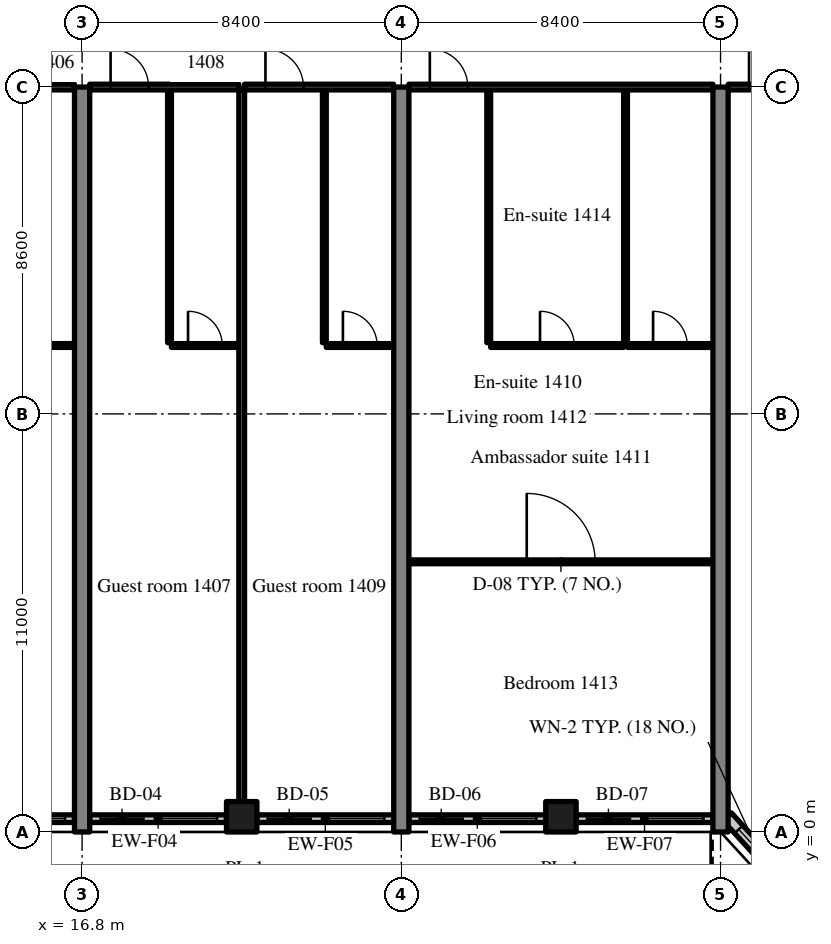
"""IFC4 building model, lengths in metres.
Left out: names, types, materials, properties, quantities, classifications, styles, units other than length and angle.
Written with IfcOpenShell. Run it as: python <this file> out.ifc"""

import sys

from ifc_helpers import new_model, si_unit, direction, frame, frame_2d, origin, origin_2d, place, context, subcontext, project, spatial, rectangle, extrude, source, transform, mapped, element, fill, save


model = new_model("IFC4")
c1 = context("Model", 3, precision=1e-05, world=origin(), true_north=direction((0.0, 1.0)))
c2 = subcontext(c1, "Body", "Model", "MODEL_VIEW")
j1 = project(units=[si_unit("LENGTHUNIT", "METRE"), si_unit("PLANEANGLEUNIT", "RADIAN")], contexts=[c1])
p1 = place(None, origin())
s1 = spatial("IfcSite", under=j1, at=p1, CompositionType="ELEMENT")
p2 = place(p1, origin())
s2 = spatial("IfcBuilding", under=s1, at=p2, CompositionType="ELEMENT")
p3 = place(p2, frame((0.0, 0.0, 62.0)))
s3 = spatial("IfcBuildingStorey", under=s2, at=p3, CompositionType="ELEMENT", Elevation=62.0)
m1 = source(origin(), c2, "Body", "SweptSolid", [
    extrude(rectangle(XDim=19.6, YDim=0.4, at=frame_2d((9.8, 0.0))), origin(), (0.0, 0.0, 1.0), 3.52),
])
for number, where, z_axis, x_axis in (
    (1, (16.8, 0.0, 0.0), (0.0, 0.0, 1.0), (0.0, 1.0, 0.0)),
    (2, (25.2, 0.0, 0.0), (0.0, 0.0, 1.0), (0.0, 1.0, 0.0)),
    (3, (33.6, 0.0, 0.0), (0.0, 0.0, 1.0), (0.0, 1.0, 0.0)),
):
    element("IfcWall", number, at=place(p3, frame(where, z_axis=z_axis, x_axis=x_axis)), inside=s3, PredefinedType="SHEAR", context=c2, shape_type="MappedRepresentation", body=[
        mapped(m1, transform((0.0, 0.0, 0.0), scale=1.0)),
    ])
m2 = source(origin(), c2, "Body", "SweptSolid", [
    extrude(rectangle(XDim=0.8, YDim=0.8, at=origin_2d()), origin(), (0.0, 0.0, 1.0), 3.52),
])
for number, where, z_axis, x_axis in (
    (4, (21.0, 0.4, 0.0), (0.0, 0.0, 1.0), (1.0, 0.0, 0.0)),
    (5, (29.4, 0.4, 0.0), (0.0, 0.0, 1.0), (1.0, 0.0, 0.0)),
):
    element("IfcColumn", number, at=place(p3, frame(where, z_axis=z_axis, x_axis=x_axis)), inside=s3, PredefinedType="COLUMN", context=c2, shape_type="MappedRepresentation", body=[
        mapped(m2, transform((0.0, 0.0, 0.0), scale=1.0)),
    ])
m3 = source(origin(), c2, "Body", "SweptSolid", [
    extrude(rectangle(XDim=3.6, YDim=0.2, at=frame_2d((1.8, 0.0))), origin(), (0.0, 0.0, 1.0), 2.82),
])
p4 = place(p3, frame((13.0, 0.35, 0.0), z_axis=(0.0, 0.0, 1.0), x_axis=(1.0, 0.0, 0.0)))
e6 = element("IfcWall", 6, at=p4, inside=s3, PredefinedType="SOLIDWALL", context=c2, shape_type="MappedRepresentation", body=[
    mapped(m3, transform((0.0, 0.0, 0.0), scale=1.0)),
])
m4 = source(origin(), c2, "Body", "SweptSolid", [
    extrude(rectangle(XDim=1.2, YDim=2.4, at=frame_2d((0.6, 1.2))), frame((0.0, 0.11, 0.0), z_axis=(0.0, -1.0, 0.0), x_axis=(1.0, 0.0, 0.0)), (0.0, 0.0, 1.0), 0.22),
])
p5 = place(p4, frame((0.25, 0.0, 0.0)))
e7 = element("IfcOpeningElement", 7, at=p5, cuts=e6, PredefinedType="OPENING", context=c2, shape_type="MappedRepresentation", body=[
    mapped(m4, transform((0.0, 0.0, 0.0), scale=1.0)),
])
m5 = source(origin(), c2, "Body", "SweptSolid", [
    extrude(rectangle(XDim=1.5, YDim=1.5, at=frame_2d((0.75, 0.75))), frame((0.0, 0.11, 0.0), z_axis=(0.0, -1.0, 0.0), x_axis=(1.0, 0.0, 0.0)), (0.0, 0.0, 1.0), 0.22),
])
p6 = place(p4, frame((1.85, 0.0, 0.9)))
e8 = element("IfcOpeningElement", 8, at=p6, cuts=e6, PredefinedType="OPENING", context=c2, shape_type="MappedRepresentation", body=[
    mapped(m5, transform((0.0, 0.0, 0.0), scale=1.0)),
])
p7 = place(p3, frame((17.0, 0.35, 0.0), z_axis=(0.0, 0.0, 1.0), x_axis=(1.0, 0.0, 0.0)))
e9 = element("IfcWall", 9, at=p7, inside=s3, PredefinedType="SOLIDWALL", context=c2, shape_type="MappedRepresentation", body=[
    mapped(m3, transform((0.0, 0.0, 0.0), scale=1.0)),
])
p8 = place(p7, frame((0.25, 0.0, 0.0)))
e10 = element("IfcOpeningElement", 10, at=p8, cuts=e9, PredefinedType="OPENING", context=c2, shape_type="MappedRepresentation", body=[
    mapped(m4, transform((0.0, 0.0, 0.0), scale=1.0)),
])
p9 = place(p7, frame((1.85, 0.0, 0.9)))
e11 = element("IfcOpeningElement", 11, at=p9, cuts=e9, PredefinedType="OPENING", context=c2, shape_type="MappedRepresentation", body=[
    mapped(m5, transform((0.0, 0.0, 0.0), scale=1.0)),
])
p10 = place(p3, frame((21.4, 0.35, 0.0), z_axis=(0.0, 0.0, 1.0), x_axis=(1.0, 0.0, 0.0)))
e12 = element("IfcWall", 12, at=p10, inside=s3, PredefinedType="SOLIDWALL", context=c2, shape_type="MappedRepresentation", body=[
    mapped(m3, transform((0.0, 0.0, 0.0), scale=1.0)),
])
p11 = place(p10, frame((0.25, 0.0, 0.0)))
e13 = element("IfcOpeningElement", 13, at=p11, cuts=e12, PredefinedType="OPENING", context=c2, shape_type="MappedRepresentation", body=[
    mapped(m4, transform((0.0, 0.0, 0.0), scale=1.0)),
])
p12 = place(p10, frame((1.85, 0.0, 0.9)))
e14 = element("IfcOpeningElement", 14, at=p12, cuts=e12, PredefinedType="OPENING", context=c2, shape_type="MappedRepresentation", body=[
    mapped(m5, transform((0.0, 0.0, 0.0), scale=1.0)),
])
p13 = place(p3, frame((25.4, 0.35, 0.0), z_axis=(0.0, 0.0, 1.0), x_axis=(1.0, 0.0, 0.0)))
e15 = element("IfcWall", 15, at=p13, inside=s3, PredefinedType="SOLIDWALL", context=c2, shape_type="MappedRepresentation", body=[
    mapped(m3, transform((0.0, 0.0, 0.0), scale=1.0)),
])
p14 = place(p13, frame((0.25, 0.0, 0.0)))
e16 = element("IfcOpeningElement", 16, at=p14, cuts=e15, PredefinedType="OPENING", context=c2, shape_type="MappedRepresentation", body=[
    mapped(m4, transform((0.0, 0.0, 0.0), scale=1.0)),
])
p15 = place(p13, frame((1.85, 0.0, 0.9)))
e17 = element("IfcOpeningElement", 17, at=p15, cuts=e15, PredefinedType="OPENING", context=c2, shape_type="MappedRepresentation", body=[
    mapped(m5, transform((0.0, 0.0, 0.0), scale=1.0)),
])
m6 = source(origin(), c2, "Body", "SweptSolid", [
    extrude(rectangle(XDim=3.6, YDim=0.2, at=frame_2d((1.8, 0.0))), origin(), (0.0, 0.0, 1.0), 2.82),
])
p16 = place(p3, frame((29.8, 0.35, 0.0), z_axis=(0.0, 0.0, 1.0), x_axis=(1.0, 0.0, 0.0)))
e18 = element("IfcWall", 18, at=p16, inside=s3, PredefinedType="SOLIDWALL", context=c2, shape_type="MappedRepresentation", body=[
    mapped(m6, transform((0.0, 0.0, 0.0), scale=1.0)),
])
p17 = place(p16, frame((0.25, 0.0, 0.0)))
e19 = element("IfcOpeningElement", 19, at=p17, cuts=e18, PredefinedType="OPENING", context=c2, shape_type="MappedRepresentation", body=[
    mapped(m4, transform((0.0, 0.0, 0.0), scale=1.0)),
])
p18 = place(p16, frame((1.85, 0.0, 0.9)))
e20 = element("IfcOpeningElement", 20, at=p18, cuts=e18, PredefinedType="OPENING", context=c2, shape_type="MappedRepresentation", body=[
    mapped(m5, transform((0.0, 0.0, 0.0), scale=1.0)),
])
m7 = source(origin(), c2, "Body", "SweptSolid", [
    extrude(rectangle(XDim=2.398, YDim=0.3, at=frame_2d((1.199, 0.0))), origin(), (0.0, 0.0, 1.0), 3.52),
])
p19 = place(p3, frame((33.776, 0.4, 0.0), z_axis=(0.0, 0.0, 1.0), x_axis=(0.675374189419, -0.737475222815, 0.0)))
e21 = element("IfcWall", 21, at=p19, inside=s3, PredefinedType="SOLIDWALL", context=c2, shape_type="MappedRepresentation", body=[
    mapped(m7, transform((0.0, 0.0, 0.0), scale=1.0)),
])
m8 = source(origin(), c2, "Body", "SweptSolid", [
    extrude(rectangle(XDim=1.5, YDim=2.0, at=frame_2d((0.75, 1.0))), frame((0.0, 0.16, 0.0), z_axis=(0.0, -1.0, 0.0), x_axis=(1.0, 0.0, 0.0)), (0.0, 0.0, 1.0), 0.32),
])
p20 = place(p19, frame((0.449, 0.0, 0.9)))
e22 = element("IfcOpeningElement", 22, at=p20, cuts=e21, PredefinedType="OPENING", context=c2, shape_type="MappedRepresentation", body=[
    mapped(m8, transform((0.0, 0.0, 0.0), scale=1.0)),
])
m9 = source(origin(), c2, "Body", "SweptSolid", [
    extrude(rectangle(XDim=2.25, YDim=0.1, at=frame_2d((1.125, 0.0))), origin(), (0.0, 0.0, 1.0), 3.52),
])
p21 = place(p3, frame((14.35, 12.8, 0.0), z_axis=(0.0, 0.0, 1.0), x_axis=(1.0, 0.0, 0.0)))
e23 = element("IfcWall", 23, at=p21, inside=s3, PredefinedType="PARTITIONING", context=c2, shape_type="MappedRepresentation", body=[
    mapped(m9, transform((0.0, 0.0, 0.0), scale=1.0)),
])
m10 = source(origin(), c2, "Body", "SweptSolid", [
    extrude(rectangle(XDim=0.9, YDim=2.1, at=frame_2d((0.45, 1.05))), frame((0.0, 0.06, 0.0), z_axis=(0.0, -1.0, 0.0), x_axis=(1.0, 0.0, 0.0)), (0.0, 0.0, 1.0), 0.12),
])
p22 = place(p21, frame((0.675, 0.0, 0.0)))
e24 = element("IfcOpeningElement", 24, at=p22, cuts=e23, PredefinedType="OPENING", context=c2, shape_type="MappedRepresentation", body=[
    mapped(m10, transform((0.0, 0.0, 0.0), scale=1.0)),
])
m11 = source(origin(), c2, "Body", "SweptSolid", [
    extrude(rectangle(XDim=8.0, YDim=0.15, at=frame_2d((4.0, 0.0))), origin(), (0.0, 0.0, 1.0), 2.82),
])
p23 = place(p3, frame((8.6, 19.6, 0.0), z_axis=(0.0, 0.0, 1.0), x_axis=(1.0, 0.0, 0.0)))
e25 = element("IfcWall", 25, at=p23, inside=s3, PredefinedType="PARTITIONING", context=c2, shape_type="MappedRepresentation", body=[
    mapped(m11, transform((0.0, 0.0, 0.0), scale=1.0)),
])
m12 = source(origin(), c2, "Body", "SweptSolid", [
    extrude(rectangle(XDim=1.0, YDim=2.1, at=frame_2d((0.5, 1.05))), frame((0.0, 0.085, 0.0), z_axis=(0.0, -1.0, 0.0), x_axis=(1.0, 0.0, 0.0)), (0.0, 0.0, 1.0), 0.17),
])
p24 = place(p23, frame((0.55, 0.0, 0.0)))
e26 = element("IfcOpeningElement", 26, at=p24, cuts=e25, PredefinedType="OPENING", context=c2, shape_type="MappedRepresentation", body=[
    mapped(m12, transform((0.0, 0.0, 0.0), scale=1.0)),
])
m13 = source(origin(), c2, "Body", "SweptSolid", [
    extrude(rectangle(XDim=6.65, YDim=0.1, at=frame_2d((3.325, 0.0))), origin(), (0.0, 0.0, 1.0), 3.52),
])
p25 = place(p3, frame((19.1, 12.875, 0.0), z_axis=(0.0, 0.0, 1.0), x_axis=(0.0, 1.0, 0.0)))
e27 = element("IfcWall", 27, at=p25, inside=s3, PredefinedType="PARTITIONING", context=c2, shape_type="MappedRepresentation", body=[
    mapped(m13, transform((0.0, 0.0, 0.0), scale=1.0)),
])
m14 = source(origin(), c2, "Body", "SweptSolid", [
    extrude(rectangle(XDim=1.775, YDim=0.1, at=frame_2d((0.888, 0.0))), origin(), (0.0, 0.0, 1.0), 3.52),
])
p26 = place(p3, frame((19.15, 12.8, 0.0), z_axis=(0.0, 0.0, 1.0), x_axis=(1.0, 0.0, 0.0)))
e28 = element("IfcWall", 28, at=p26, inside=s3, PredefinedType="PARTITIONING", context=c2, shape_type="MappedRepresentation", body=[
    mapped(m14, transform((0.0, 0.0, 0.0), scale=1.0)),
])
p27 = place(p26, frame((0.438, 0.0, 0.0)))
e29 = element("IfcOpeningElement", 29, at=p27, cuts=e28, PredefinedType="OPENING", context=c2, shape_type="MappedRepresentation", body=[
    mapped(m10, transform((0.0, 0.0, 0.0), scale=1.0)),
])
m15 = source(origin(), c2, "Body", "SweptSolid", [
    extrude(rectangle(XDim=3.925, YDim=0.15, at=frame_2d((1.962, 0.0))), origin(), (0.0, 0.0, 1.0), 2.82),
])
p28 = place(p3, frame((17.0, 19.6, 0.0), z_axis=(0.0, 0.0, 1.0), x_axis=(1.0, 0.0, 0.0)))
e30 = element("IfcWall", 30, at=p28, inside=s3, PredefinedType="PARTITIONING", context=c2, shape_type="MappedRepresentation", body=[
    mapped(m15, transform((0.0, 0.0, 0.0), scale=1.0)),
])
p29 = place(p28, frame((0.55, 0.0, 0.0)))
e31 = element("IfcOpeningElement", 31, at=p29, cuts=e30, PredefinedType="OPENING", context=c2, shape_type="MappedRepresentation", body=[
    mapped(m12, transform((0.0, 0.0, 0.0), scale=1.0)),
])
p30 = place(p3, frame((23.175, 12.875, 0.0), z_axis=(0.0, 0.0, 1.0), x_axis=(0.0, 1.0, 0.0)))
e32 = element("IfcWall", 32, at=p30, inside=s3, PredefinedType="PARTITIONING", context=c2, shape_type="MappedRepresentation", body=[
    mapped(m13, transform((0.0, 0.0, 0.0), scale=1.0)),
])
m16 = source(origin(), c2, "Body", "SweptSolid", [
    extrude(rectangle(XDim=1.775, YDim=0.1, at=frame_2d((0.887, 0.0))), origin(), (0.0, 0.0, 1.0), 3.52),
])
p31 = place(p3, frame((23.225, 12.8, 0.0), z_axis=(0.0, 0.0, 1.0), x_axis=(1.0, 0.0, 0.0)))
e33 = element("IfcWall", 33, at=p31, inside=s3, PredefinedType="PARTITIONING", context=c2, shape_type="MappedRepresentation", body=[
    mapped(m16, transform((0.0, 0.0, 0.0), scale=1.0)),
])
p32 = place(p31, frame((0.438, 0.0, 0.0)))
e34 = element("IfcOpeningElement", 34, at=p32, cuts=e33, PredefinedType="OPENING", context=c2, shape_type="MappedRepresentation", body=[
    mapped(m10, transform((0.0, 0.0, 0.0), scale=1.0)),
])
p33 = place(p3, frame((21.075, 19.6, 0.0), z_axis=(0.0, 0.0, 1.0), x_axis=(1.0, 0.0, 0.0)))
e35 = element("IfcWall", 35, at=p33, inside=s3, PredefinedType="PARTITIONING", context=c2, shape_type="MappedRepresentation", body=[
    mapped(m15, transform((0.0, 0.0, 0.0), scale=1.0)),
])
p34 = place(p33, frame((0.55, 0.0, 0.0)))
e36 = element("IfcOpeningElement", 36, at=p34, cuts=e35, PredefinedType="OPENING", context=c2, shape_type="MappedRepresentation", body=[
    mapped(m12, transform((0.0, 0.0, 0.0), scale=1.0)),
])
m17 = source(origin(), c2, "Body", "SweptSolid", [
    extrude(rectangle(XDim=18.725, YDim=0.15, at=frame_2d((9.362, 0.0))), origin(), (0.0, 0.0, 1.0), 3.52),
])
p35 = place(p3, frame((21.0, 0.8, 0.0), z_axis=(0.0, 0.0, 1.0), x_axis=(0.0, 1.0, 0.0)))
e37 = element("IfcWall", 37, at=p35, inside=s3, PredefinedType="PARTITIONING", context=c2, shape_type="MappedRepresentation", body=[
    mapped(m17, transform((0.0, 0.0, 0.0), scale=1.0)),
])
for number, where, z_axis, x_axis in (
    (38, (27.5, 12.875, 0.0), (0.0, 0.0, 1.0), (0.0, 1.0, 0.0)),
    (39, (31.1, 12.875, 0.0), (0.0, 0.0, 1.0), (0.0, 1.0, 0.0)),
):
    element("IfcWall", number, at=place(p3, frame(where, z_axis=z_axis, x_axis=x_axis)), inside=s3, PredefinedType="PARTITIONING", context=c2, shape_type="MappedRepresentation", body=[
        mapped(m13, transform((0.0, 0.0, 0.0), scale=1.0)),
    ])
m18 = source(origin(), c2, "Body", "SweptSolid", [
    extrude(rectangle(XDim=3.5, YDim=0.1, at=frame_2d((1.75, 0.0))), origin(), (0.0, 0.0, 1.0), 3.52),
])
p36 = place(p3, frame((27.55, 12.8, 0.0), z_axis=(0.0, 0.0, 1.0), x_axis=(1.0, 0.0, 0.0)))
e40 = element("IfcWall", 40, at=p36, inside=s3, PredefinedType="PARTITIONING", context=c2, shape_type="MappedRepresentation", body=[
    mapped(m18, transform((0.0, 0.0, 0.0), scale=1.0)),
])
p37 = place(p36, frame((1.3, 0.0, 0.0)))
e41 = element("IfcOpeningElement", 41, at=p37, cuts=e40, PredefinedType="OPENING", context=c2, shape_type="MappedRepresentation", body=[
    mapped(m10, transform((0.0, 0.0, 0.0), scale=1.0)),
])
p38 = place(p3, frame((31.15, 12.8, 0.0), z_axis=(0.0, 0.0, 1.0), x_axis=(1.0, 0.0, 0.0)))
e42 = element("IfcWall", 42, at=p38, inside=s3, PredefinedType="PARTITIONING", context=c2, shape_type="MappedRepresentation", body=[
    mapped(m9, transform((0.0, 0.0, 0.0), scale=1.0)),
])
p39 = place(p38, frame((0.675, 0.0, 0.0)))
e43 = element("IfcOpeningElement", 43, at=p39, cuts=e42, PredefinedType="OPENING", context=c2, shape_type="MappedRepresentation", body=[
    mapped(m10, transform((0.0, 0.0, 0.0), scale=1.0)),
])
m19 = source(origin(), c2, "Body", "SweptSolid", [
    extrude(rectangle(XDim=8.0, YDim=0.1, at=frame_2d((4.0, 0.0))), origin(), (0.0, 0.0, 1.0), 3.52),
])
p40 = place(p3, frame((25.4, 7.108, 0.0), z_axis=(0.0, 0.0, 1.0), x_axis=(1.0, 0.0, 0.0)))
e44 = element("IfcWall", 44, at=p40, inside=s3, PredefinedType="PARTITIONING", context=c2, shape_type="MappedRepresentation", body=[
    mapped(m19, transform((0.0, 0.0, 0.0), scale=1.0)),
])
m20 = source(origin(), c2, "Body", "SweptSolid", [
    extrude(rectangle(XDim=1.8, YDim=2.1, at=frame_2d((0.9, 1.05))), frame((0.0, 0.06, 0.0), z_axis=(0.0, -1.0, 0.0), x_axis=(1.0, 0.0, 0.0)), (0.0, 0.0, 1.0), 0.12),
])
p41 = place(p40, frame((3.1, 0.0, 0.0)))
e45 = element("IfcOpeningElement", 45, at=p41, cuts=e44, PredefinedType="OPENING", context=c2, shape_type="MappedRepresentation", body=[
    mapped(m20, transform((0.0, 0.0, 0.0), scale=1.0)),
])
p42 = place(p3, frame((25.4, 19.6, 0.0), z_axis=(0.0, 0.0, 1.0), x_axis=(1.0, 0.0, 0.0)))
e46 = element("IfcWall", 46, at=p42, inside=s3, PredefinedType="PARTITIONING", context=c2, shape_type="MappedRepresentation", body=[
    mapped(m11, transform((0.0, 0.0, 0.0), scale=1.0)),
])
p43 = place(p42, frame((0.55, 0.0, 0.0)))
e47 = element("IfcOpeningElement", 47, at=p43, cuts=e46, PredefinedType="OPENING", context=c2, shape_type="MappedRepresentation", body=[
    mapped(m12, transform((0.0, 0.0, 0.0), scale=1.0)),
])
p44 = place(p3, frame((33.8, 19.6, 0.0), z_axis=(0.0, 0.0, 1.0), x_axis=(1.0, 0.0, 0.0)))
e48 = element("IfcWall", 48, at=p44, inside=s3, PredefinedType="PARTITIONING", context=c2, shape_type="MappedRepresentation", body=[
    mapped(m11, transform((0.0, 0.0, 0.0), scale=1.0)),
])
p45 = place(p44, frame((0.55, 0.0, 0.0)))
e49 = element("IfcOpeningElement", 49, at=p45, cuts=e48, PredefinedType="OPENING", context=c2, shape_type="MappedRepresentation", body=[
    mapped(m12, transform((0.0, 0.0, 0.0), scale=1.0)),
])
m21 = source(origin(), c2, "Body", "SweptSolid", [
    extrude(rectangle(XDim=1.5, YDim=1.5, at=frame_2d((0.75, 0.75))), frame((0.0, 0.03, 0.0), z_axis=(0.0, -1.0, 0.0), x_axis=(1.0, 0.0, 0.0)), (0.0, 0.0, 1.0), 0.06),
])
p46 = place(p6, origin())
e50 = element("IfcWindow", 50, at=p46, inside=s3, PartitioningType="SINGLE_PANEL", PredefinedType="WINDOW", context=c2, shape_type="MappedRepresentation", body=[
    mapped(m21, transform((0.0, 0.0, 0.0), scale=1.0)),
])
fill(e8, e50)
m22 = source(origin(), c2, "Body", "SweptSolid", [
    extrude(rectangle(XDim=1.2, YDim=2.4, at=frame_2d((0.6, 1.2))), frame((0.0, 0.025, 0.0), z_axis=(0.0, -1.0, 0.0), x_axis=(1.0, 0.0, 0.0)), (0.0, 0.0, 1.0), 0.05),
])
p47 = place(p8, origin())
e51 = element("IfcDoor", 51, at=p47, inside=s3, OperationType="SLIDING_TO_RIGHT", PredefinedType="DOOR", context=c2, shape_type="MappedRepresentation", body=[
    mapped(m22, transform((0.0, 0.0, 0.0), scale=1.0)),
])
fill(e10, e51)
p48 = place(p9, origin())
e52 = element("IfcWindow", 52, at=p48, inside=s3, PartitioningType="SINGLE_PANEL", PredefinedType="WINDOW", context=c2, shape_type="MappedRepresentation", body=[
    mapped(m21, transform((0.0, 0.0, 0.0), scale=1.0)),
])
fill(e11, e52)
p49 = place(p11, origin())
e53 = element("IfcDoor", 53, at=p49, inside=s3, OperationType="SLIDING_TO_LEFT", PredefinedType="DOOR", context=c2, shape_type="MappedRepresentation", body=[
    mapped(m22, transform((0.0, 0.0, 0.0), scale=1.0)),
])
fill(e13, e53)
p50 = place(p12, origin())
e54 = element("IfcWindow", 54, at=p50, inside=s3, PartitioningType="SINGLE_PANEL", PredefinedType="WINDOW", context=c2, shape_type="MappedRepresentation", body=[
    mapped(m21, transform((0.0, 0.0, 0.0), scale=1.0)),
])
fill(e14, e54)
p51 = place(p14, origin())
e55 = element("IfcDoor", 55, at=p51, inside=s3, OperationType="SLIDING_TO_RIGHT", PredefinedType="DOOR", context=c2, shape_type="MappedRepresentation", body=[
    mapped(m22, transform((0.0, 0.0, 0.0), scale=1.0)),
])
fill(e16, e55)
p52 = place(p15, origin())
e56 = element("IfcWindow", 56, at=p52, inside=s3, PartitioningType="SINGLE_PANEL", PredefinedType="WINDOW", context=c2, shape_type="MappedRepresentation", body=[
    mapped(m21, transform((0.0, 0.0, 0.0), scale=1.0)),
])
fill(e17, e56)
p53 = place(p17, origin())
e57 = element("IfcDoor", 57, at=p53, inside=s3, OperationType="SLIDING_TO_LEFT", PredefinedType="DOOR", context=c2, shape_type="MappedRepresentation", body=[
    mapped(m22, transform((0.0, 0.0, 0.0), scale=1.0)),
])
fill(e19, e57)
p54 = place(p18, origin())
e58 = element("IfcWindow", 58, at=p54, inside=s3, PartitioningType="SINGLE_PANEL", PredefinedType="WINDOW", context=c2, shape_type="MappedRepresentation", body=[
    mapped(m21, transform((0.0, 0.0, 0.0), scale=1.0)),
])
fill(e20, e58)
m23 = source(origin(), c2, "Body", "SweptSolid", [
    extrude(rectangle(XDim=1.5, YDim=2.0, at=frame_2d((0.75, 1.0))), frame((0.0, 0.03, 0.0), z_axis=(0.0, -1.0, 0.0), x_axis=(1.0, 0.0, 0.0)), (0.0, 0.0, 1.0), 0.06),
])
p55 = place(p20, origin())
e59 = element("IfcWindow", 59, at=p55, inside=s3, PartitioningType="SINGLE_PANEL", PredefinedType="WINDOW", context=c2, shape_type="MappedRepresentation", body=[
    mapped(m23, transform((0.0, 0.0, 0.0), scale=1.0)),
])
fill(e22, e59)
m24 = source(origin(), c2, "Body", "SweptSolid", [
    extrude(rectangle(XDim=0.9, YDim=2.1, at=frame_2d((0.45, 1.05))), frame((0.0, 0.025, 0.0), z_axis=(0.0, -1.0, 0.0), x_axis=(1.0, 0.0, 0.0)), (0.0, 0.0, 1.0), 0.05),
])
p56 = place(p27, origin())
e60 = element("IfcDoor", 60, at=p56, inside=s3, OperationType="SINGLE_SWING_LEFT", PredefinedType="DOOR", context=c2, shape_type="MappedRepresentation", body=[
    mapped(m24, transform((0.0, 0.0, 0.0), scale=1.0)),
])
fill(e29, e60)
m25 = source(origin(), c2, "Body", "SweptSolid", [
    extrude(rectangle(XDim=1.0, YDim=2.1, at=frame_2d((0.5, 1.05))), frame((0.0, 0.025, 0.0), z_axis=(0.0, -1.0, 0.0), x_axis=(1.0, 0.0, 0.0)), (0.0, 0.0, 1.0), 0.05),
])
p57 = place(p29, origin())
e61 = element("IfcDoor", 61, at=p57, inside=s3, OperationType="SINGLE_SWING_LEFT", PredefinedType="DOOR", context=c2, shape_type="MappedRepresentation", body=[
    mapped(m25, transform((0.0, 0.0, 0.0), scale=1.0)),
])
fill(e31, e61)
p58 = place(p32, origin())
e62 = element("IfcDoor", 62, at=p58, inside=s3, OperationType="SINGLE_SWING_LEFT", PredefinedType="DOOR", context=c2, shape_type="MappedRepresentation", body=[
    mapped(m24, transform((0.0, 0.0, 0.0), scale=1.0)),
])
fill(e34, e62)
p59 = place(p34, origin())
e63 = element("IfcDoor", 63, at=p59, inside=s3, OperationType="SINGLE_SWING_LEFT", PredefinedType="DOOR", context=c2, shape_type="MappedRepresentation", body=[
    mapped(m25, transform((0.0, 0.0, 0.0), scale=1.0)),
])
fill(e36, e63)
p60 = place(p37, origin())
e64 = element("IfcDoor", 64, at=p60, inside=s3, OperationType="SINGLE_SWING_LEFT", PredefinedType="DOOR", context=c2, shape_type="MappedRepresentation", body=[
    mapped(m24, transform((0.0, 0.0, 0.0), scale=1.0)),
])
fill(e41, e64)
p61 = place(p39, origin())
e65 = element("IfcDoor", 65, at=p61, inside=s3, OperationType="SINGLE_SWING_LEFT", PredefinedType="DOOR", context=c2, shape_type="MappedRepresentation", body=[
    mapped(m24, transform((0.0, 0.0, 0.0), scale=1.0)),
])
fill(e43, e65)
m26 = source(origin(), c2, "Body", "SweptSolid", [
    extrude(rectangle(XDim=1.8, YDim=2.1, at=frame_2d((0.9, 1.05))), frame((0.0, 0.025, 0.0), z_axis=(0.0, -1.0, 0.0), x_axis=(1.0, 0.0, 0.0)), (0.0, 0.0, 1.0), 0.05),
])
p62 = place(p41, origin())
e66 = element("IfcDoor", 66, at=p62, inside=s3, OperationType="DOUBLE_DOOR_SINGLE_SWING", PredefinedType="DOOR", context=c2, shape_type="MappedRepresentation", body=[
    mapped(m26, transform((0.0, 0.0, 0.0), scale=1.0)),
])
fill(e45, e66)
p63 = place(p43, origin())
e67 = element("IfcDoor", 67, at=p63, inside=s3, OperationType="SINGLE_SWING_LEFT", PredefinedType="DOOR", context=c2, shape_type="MappedRepresentation", body=[
    mapped(m25, transform((0.0, 0.0, 0.0), scale=1.0)),
])
fill(e47, e67)
p64 = place(p45, origin())
e68 = element("IfcDoor", 68, at=p64, inside=s3, OperationType="SINGLE_SWING_LEFT", PredefinedType="DOOR", context=c2, shape_type="MappedRepresentation", body=[
    mapped(m25, transform((0.0, 0.0, 0.0), scale=1.0)),
])
fill(e49, e68)
save(model, sys.argv[1])
